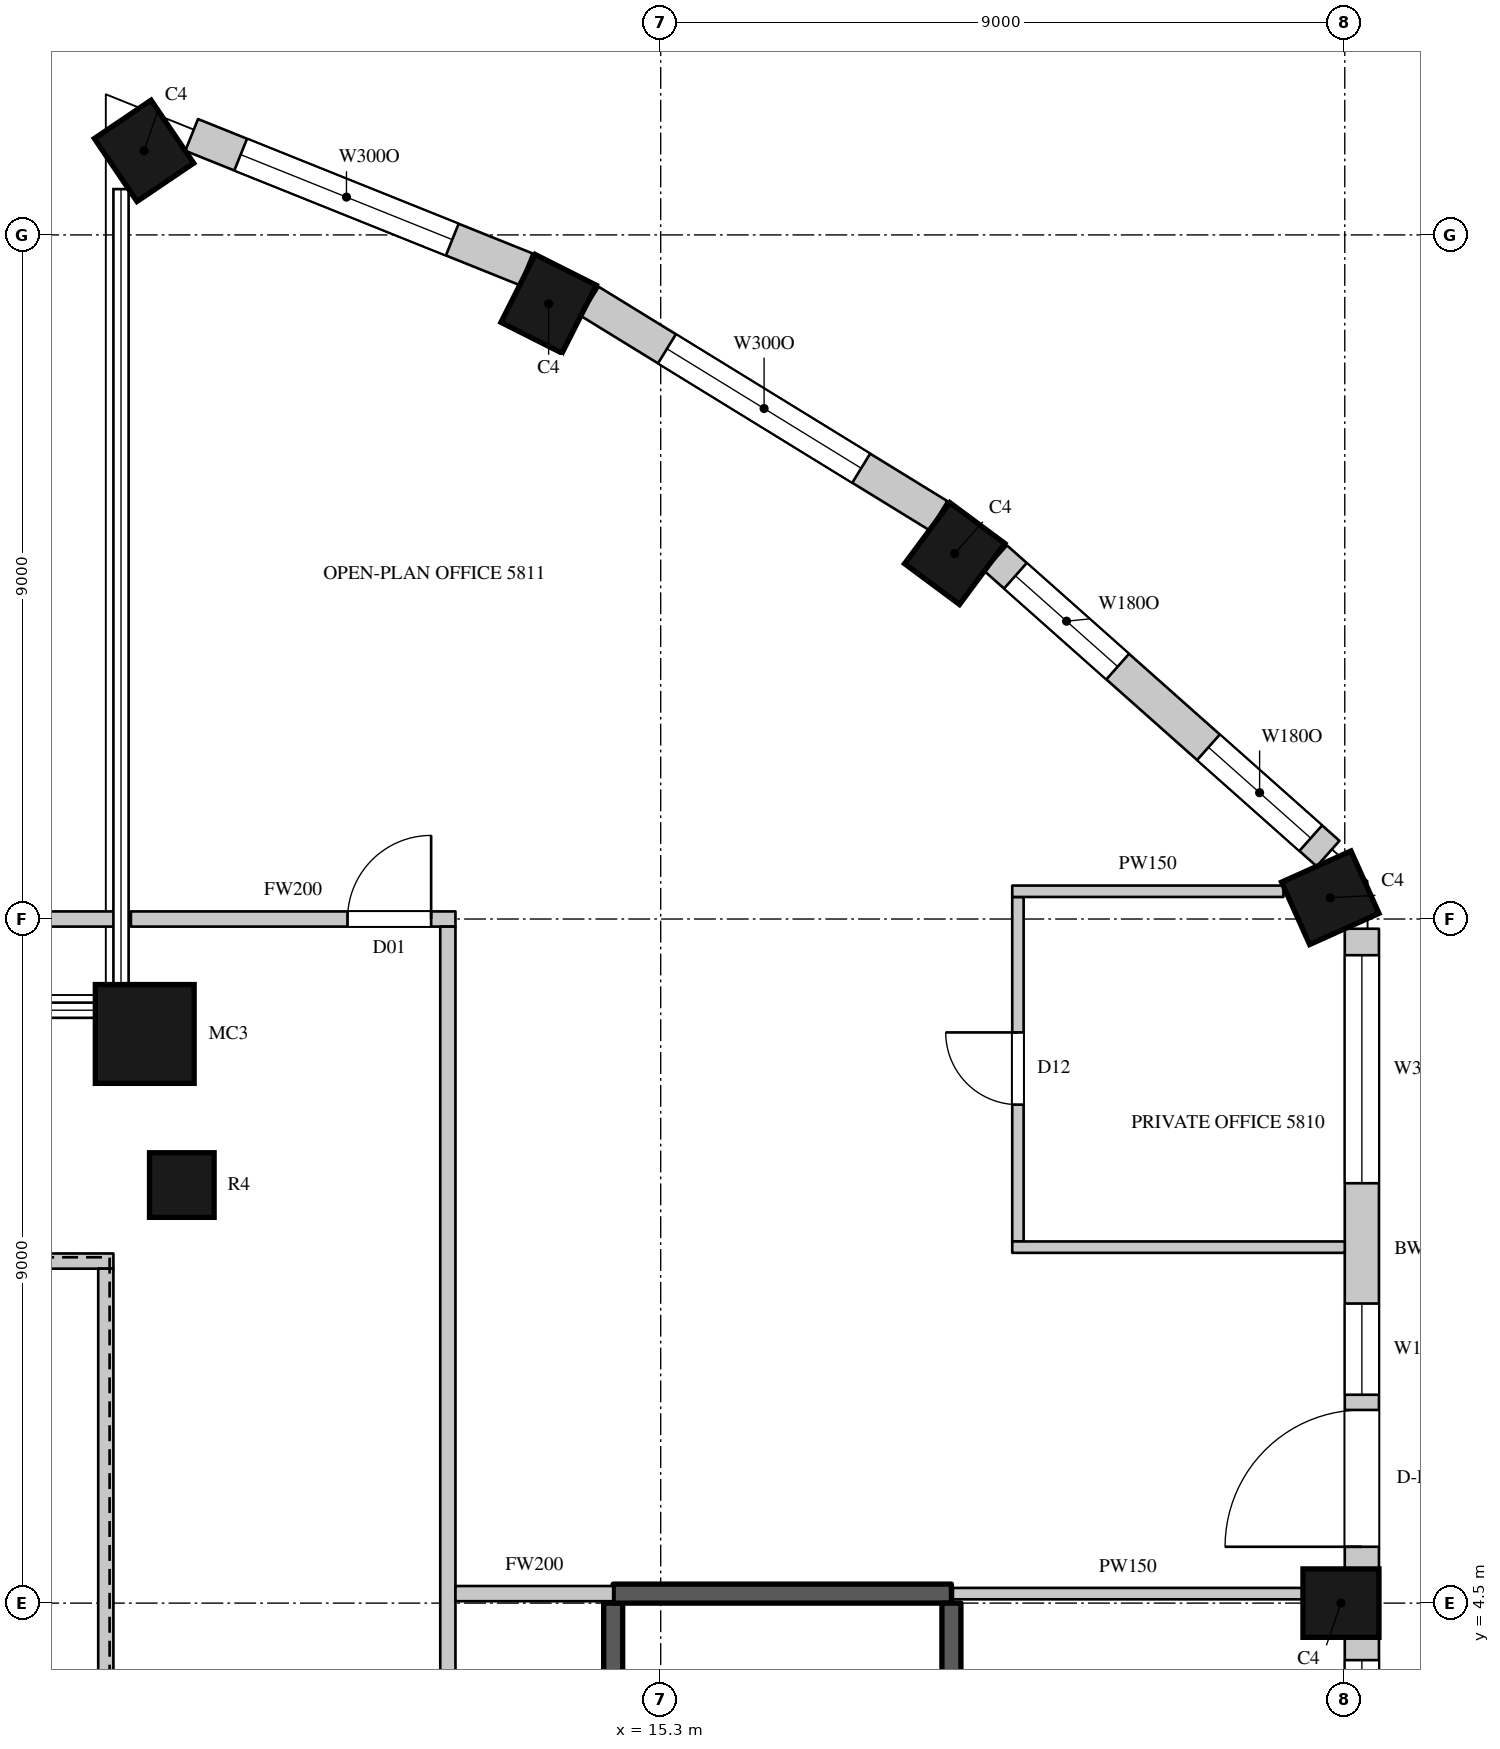
"""IFC4 building model, lengths in metres.
Left out: names, types, materials, properties, quantities, classifications, styles, units other than length and angle.
Written with IfcOpenShell. Run it as: python <this file> out.ifc"""

import sys

from ifc_helpers import new_model, si_unit, direction, frame, frame_2d, origin, origin_2d, place, context, subcontext, project, spatial, rectangle, circle, extrude, element, fill, save


model = new_model("IFC4")
c1 = context("Model", 3, precision=1e-05, world=origin(), true_north=direction((0.0, 1.0)))
c2 = subcontext(c1, "Body", "Model", "MODEL_VIEW")
j1 = project(units=[si_unit("LENGTHUNIT", "METRE"), si_unit("PLANEANGLEUNIT", "RADIAN")], contexts=[c1])
p1 = place(None, origin())
s1 = spatial("IfcSite", under=j1, at=p1, CompositionType="ELEMENT")
p2 = place(p1, origin())
s2 = spatial("IfcBuilding", under=s1, at=p2, CompositionType="ELEMENT")
p3 = place(p2, frame((0.0, 0.0, 259.8)))
s3 = spatial("IfcBuildingStorey", under=s2, at=p3, CompositionType="ELEMENT", Elevation=259.8)
p4 = place(p3, frame((8.503, 23.606, 0.0), z_axis=(0.0, 0.0, 1.0), x_axis=(-0.828469606019, -0.560034027451, 0.0)))
e1 = element("IfcColumn", 1, at=p4, inside=s3, PredefinedType="COLUMN", context=c2, shape_type="SweptSolid", body=[
    extrude(rectangle(XDim=0.9, YDim=1.0, at=origin_2d()), origin(), (0.0, 0.0, 1.0), 4.1),
])
p5 = place(p3, frame((8.512, 11.988, 0.0), z_axis=(0.0, 0.0, 1.0), x_axis=(1.0, 0.0, 0.0)))
e2 = element("IfcColumn", 2, at=p5, inside=s3, PredefinedType="COLUMN", context=c2, shape_type="SweptSolid", body=[
    extrude(circle(Radius=0.65, at=origin_2d()), origin(), (0.0, 0.0, 1.0), 4.1),
])
for number, where, z_axis, x_axis in (
    (3, (24.25, 4.5, 0.0), (0.0, 0.0, 1.0), (0.0, 1.0, 0.0)),
    (4, (24.11, 13.78, 0.0), (0.0, 0.0, 1.0), (-0.41, 0.912, 0.0)),
    (5, (19.168, 18.308, 0.0), (0.0, 0.0, 1.0), (-0.803, 0.596, 0.0)),
    (6, (13.826, 21.594, 0.0), (0.0, 0.0, 1.0), (-0.893, 0.45, 0.0)),
):
    element("IfcColumn", number, at=place(p3, frame(where, z_axis=z_axis, x_axis=x_axis)), inside=s3, PredefinedType="COLUMN", context=c2, shape_type="SweptSolid", body=[
        extrude(rectangle(XDim=0.9, YDim=1.0, at=origin_2d()), origin(), (0.0, 0.0, 1.0), 4.1),
    ])
p6 = place(p3, frame((9.0, 10.0, 0.0), z_axis=(0.0, 0.0, 1.0), x_axis=(1.0, 0.0, 0.0)))
e7 = element("IfcColumn", 7, at=p6, inside=s3, PredefinedType="COLUMN", context=c2, shape_type="SweptSolid", body=[
    extrude(circle(Radius=0.425, at=origin_2d()), origin(), (0.0, 0.0, 1.0), 4.1),
])
p7 = place(p3, frame((24.525, -4.05, 0.0), z_axis=(0.0, 0.0, 1.0), x_axis=(0.0, 1.0, 0.0)))
e8 = element("IfcWall", 8, at=p7, inside=s3, PredefinedType="SOLIDWALL", context=c2, shape_type="SweptSolid", body=[
    extrude(rectangle(XDim=8.1, YDim=0.45, at=frame_2d((4.05, 0.0))), origin(), (0.0, 0.0, 1.0), 3.8),
])
p8 = place(p7, frame((0.3, 0.0, 1.05)))
e9 = element("IfcOpeningElement", 9, at=p8, cuts=e8, PredefinedType="OPENING", context=c2, shape_type="SweptSolid", body=[
    extrude(rectangle(XDim=3.0, YDim=2.4, at=frame_2d((1.5, 1.2))), frame((0.0, 0.235, 0.0), z_axis=(0.0, -1.0, 0.0), x_axis=(1.0, 0.0, 0.0)), (0.0, 0.0, 1.0), 0.47),
])
p9 = place(p7, frame((4.8, 0.0, 1.05)))
e10 = element("IfcOpeningElement", 10, at=p9, cuts=e8, PredefinedType="OPENING", context=c2, shape_type="SweptSolid", body=[
    extrude(rectangle(XDim=3.0, YDim=2.4, at=frame_2d((1.5, 1.2))), frame((0.0, 0.235, 0.0), z_axis=(0.0, -1.0, 0.0), x_axis=(1.0, 0.0, 0.0)), (0.0, 0.0, 1.0), 0.47),
])
p10 = place(p3, frame((24.525, 4.95, 0.0), z_axis=(0.0, 0.0, 1.0), x_axis=(0.0, 1.0, 0.0)))
e11 = element("IfcWall", 11, at=p10, inside=s3, PredefinedType="SOLIDWALL", context=c2, shape_type="SweptSolid", body=[
    extrude(rectangle(XDim=8.422, YDim=0.45, at=frame_2d((4.211, 0.0))), origin(), (0.0, 0.0, 1.0), 3.8),
])
p11 = place(p10, frame((0.291, 0.0, 0.0)))
e12 = element("IfcOpeningElement", 12, at=p11, cuts=e11, PredefinedType="OPENING", context=c2, shape_type="SweptSolid", body=[
    extrude(rectangle(XDim=1.8, YDim=2.4, at=frame_2d((0.9, 1.2))), frame((0.0, 0.235, 0.0), z_axis=(0.0, -1.0, 0.0), x_axis=(1.0, 0.0, 0.0)), (0.0, 0.0, 1.0), 0.47),
])
p12 = place(p10, frame((2.291, 0.0, 1.05)))
e13 = element("IfcOpeningElement", 13, at=p12, cuts=e11, PredefinedType="OPENING", context=c2, shape_type="SweptSolid", body=[
    extrude(rectangle(XDim=1.2, YDim=2.4, at=frame_2d((0.6, 1.2))), frame((0.0, 0.235, 0.0), z_axis=(0.0, -1.0, 0.0), x_axis=(1.0, 0.0, 0.0)), (0.0, 0.0, 1.0), 0.47),
])
p13 = place(p10, frame((5.074, 0.0, 1.05)))
e14 = element("IfcOpeningElement", 14, at=p13, cuts=e11, PredefinedType="OPENING", context=c2, shape_type="SweptSolid", body=[
    extrude(rectangle(XDim=3.0, YDim=2.4, at=frame_2d((1.5, 1.2))), frame((0.0, 0.235, 0.0), z_axis=(0.0, -1.0, 0.0), x_axis=(1.0, 0.0, 0.0)), (0.0, 0.0, 1.0), 0.47),
])
p14 = place(p3, frame((24.081, 14.361, 0.0), z_axis=(0.0, 0.0, 1.0), x_axis=(-0.747570482973, 0.664182484704, 0.0)))
e15 = element("IfcWall", 15, at=p14, inside=s3, PredefinedType="SOLIDWALL", context=c2, shape_type="SweptSolid", body=[
    extrude(rectangle(XDim=5.85, YDim=0.45, at=frame_2d((2.925, 0.0))), origin(), (0.0, 0.0, 1.0), 3.8),
])
p15 = place(p14, frame((0.305, 0.0, 1.05)))
e16 = element("IfcOpeningElement", 16, at=p15, cuts=e15, PredefinedType="OPENING", context=c2, shape_type="SweptSolid", body=[
    extrude(rectangle(XDim=1.8, YDim=2.4, at=frame_2d((0.9, 1.2))), frame((0.0, 0.235, 0.0), z_axis=(0.0, -1.0, 0.0), x_axis=(1.0, 0.0, 0.0)), (0.0, 0.0, 1.0), 0.47),
])
p16 = place(p14, frame((3.703, 0.0, 1.05)))
e17 = element("IfcOpeningElement", 17, at=p16, cuts=e15, PredefinedType="OPENING", context=c2, shape_type="SweptSolid", body=[
    extrude(rectangle(XDim=1.8, YDim=2.4, at=frame_2d((0.9, 1.2))), frame((0.0, 0.235, 0.0), z_axis=(0.0, -1.0, 0.0), x_axis=(1.0, 0.0, 0.0)), (0.0, 0.0, 1.0), 0.47),
])
p17 = place(p3, frame((18.953, 18.806, 0.0), z_axis=(0.0, 0.0, 1.0), x_axis=(-0.851860664503, 0.523768468193, 0.0)))
e18 = element("IfcWall", 18, at=p17, inside=s3, PredefinedType="SOLIDWALL", context=c2, shape_type="SweptSolid", body=[
    extrude(rectangle(XDim=5.384, YDim=0.45, at=frame_2d((2.692, 0.0))), origin(), (0.0, 0.0, 1.0), 3.8),
])
p18 = place(p17, frame((1.192, 0.0, 1.05)))
e19 = element("IfcOpeningElement", 19, at=p18, cuts=e18, PredefinedType="OPENING", context=c2, shape_type="SweptSolid", body=[
    extrude(rectangle(XDim=3.0, YDim=2.4, at=frame_2d((1.5, 1.2))), frame((0.0, 0.235, 0.0), z_axis=(0.0, -1.0, 0.0), x_axis=(1.0, 0.0, 0.0)), (0.0, 0.0, 1.0), 0.47),
])
p19 = place(p3, frame((13.529, 22.048, 0.0), z_axis=(0.0, 0.0, 1.0), x_axis=(-0.927957332619, 0.372686448424, 0.0)))
e20 = element("IfcWall", 20, at=p19, inside=s3, PredefinedType="SOLIDWALL", context=c2, shape_type="SweptSolid", body=[
    extrude(rectangle(XDim=4.741, YDim=0.45, at=frame_2d((2.371, 0.0))), origin(), (0.0, 0.0, 1.0), 3.8),
])
p20 = place(p19, frame((1.047, 0.0, 1.05)))
e21 = element("IfcOpeningElement", 21, at=p20, cuts=e20, PredefinedType="OPENING", context=c2, shape_type="SweptSolid", body=[
    extrude(rectangle(XDim=3.0, YDim=2.4, at=frame_2d((1.5, 1.2))), frame((0.0, 0.235, 0.0), z_axis=(0.0, -1.0, 0.0), x_axis=(1.0, 0.0, 0.0)), (0.0, 0.0, 1.0), 0.47),
])
p21 = place(p3, frame((-6.27, 13.5, 0.0), z_axis=(0.0, 0.0, 1.0), x_axis=(1.0, 0.0, 0.0)))
e22 = element("IfcWall", 22, at=p21, inside=s3, PredefinedType="PARTITIONING", context=c2, shape_type="SweptSolid", body=[
    extrude(rectangle(XDim=14.57, YDim=0.2, at=frame_2d((7.285, 0.0))), origin(), (0.0, 0.0, 1.0), 3.8),
])
p22 = place(p3, frame((-6.1, 9.0, 0.0), z_axis=(0.0, 0.0, 1.0), x_axis=(1.0, 0.0, 0.0)))
e23 = element("IfcWall", 23, at=p22, inside=s3, PredefinedType="PARTITIONING", context=c2, shape_type="SweptSolid", body=[
    extrude(rectangle(XDim=14.2, YDim=0.2, at=frame_2d((7.1, 0.0))), origin(), (0.0, 0.0, 1.0), 3.8),
])
p23 = place(p3, frame((8.0, -8.9, 0.0), z_axis=(0.0, 0.0, 1.0), x_axis=(0.0, 1.0, 0.0)))
e24 = element("IfcWall", 24, at=p23, inside=s3, PredefinedType="PARTITIONING", context=c2, shape_type="SweptSolid", body=[
    extrude(rectangle(XDim=17.8, YDim=0.2, at=frame_2d((8.9, 0.0))), origin(), (0.0, 0.0, 1.0), 3.8),
])
p24 = place(p3, frame((8.33, 13.5, 0.0), z_axis=(0.0, 0.0, 1.0), x_axis=(1.0, 0.0, 0.0)))
e25 = element("IfcWall", 25, at=p24, inside=s3, PredefinedType="PARTITIONING", context=c2, shape_type="SweptSolid", body=[
    extrude(rectangle(XDim=4.27, YDim=0.2, at=frame_2d((2.135, 0.0))), origin(), (0.0, 0.0, 1.0), 3.8),
])
p25 = place(p24, frame((2.85, 0.0, 0.0)))
e26 = element("IfcOpeningElement", 26, at=p25, cuts=e25, PredefinedType="OPENING", context=c2, shape_type="SweptSolid", body=[
    extrude(rectangle(XDim=1.1, YDim=2.4, at=frame_2d((0.55, 1.2))), frame((0.0, 0.11, 0.0), z_axis=(0.0, -1.0, 0.0), x_axis=(1.0, 0.0, 0.0)), (0.0, 0.0, 1.0), 0.22),
])
p26 = place(p3, frame((12.5, -13.5, 0.0), z_axis=(0.0, 0.0, 1.0), x_axis=(0.0, 1.0, 0.0)))
e27 = element("IfcWall", 27, at=p26, inside=s3, PredefinedType="PARTITIONING", context=c2, shape_type="SweptSolid", body=[
    extrude(rectangle(XDim=26.9, YDim=0.2, at=frame_2d((13.45, 0.0))), origin(), (0.0, 0.0, 1.0), 3.8),
])
p27 = place(p26, frame((12.75, 0.0, 0.0)))
e28 = element("IfcOpeningElement", 28, at=p27, cuts=e27, PredefinedType="OPENING", context=c2, shape_type="SweptSolid", body=[
    extrude(rectangle(XDim=1.5, YDim=2.4, at=frame_2d((0.75, 1.2))), frame((0.0, 0.11, 0.0), z_axis=(0.0, -1.0, 0.0), x_axis=(1.0, 0.0, 0.0)), (0.0, 0.0, 1.0), 0.22),
])
p28 = place(p3, frame((12.6, 4.625, 0.0), z_axis=(0.0, 0.0, 1.0), x_axis=(1.0, 0.0, 0.0)))
e29 = element("IfcWall", 29, at=p28, inside=s3, PredefinedType="PARTITIONING", context=c2, shape_type="SweptSolid", body=[
    extrude(rectangle(XDim=2.075, YDim=0.2, at=frame_2d((1.038, 0.0))), origin(), (0.0, 0.0, 1.0), 3.8),
])
p29 = place(p3, frame((19.145, 4.625, 0.0), z_axis=(0.0, 0.0, 1.0), x_axis=(1.0, 0.0, 0.0)))
e30 = element("IfcWall", 30, at=p29, inside=s3, PredefinedType="PARTITIONING", context=c2, shape_type="SweptSolid", body=[
    extrude(rectangle(XDim=4.605, YDim=0.15, at=frame_2d((2.302, 0.0))), origin(), (0.0, 0.0, 1.0), 3.8),
])
p30 = place(p3, frame((20.0, 9.258, 0.0), z_axis=(0.0, 0.0, 1.0), x_axis=(0.0, 1.0, 0.0)))
e31 = element("IfcWall", 31, at=p30, inside=s3, PredefinedType="PARTITIONING", context=c2, shape_type="SweptSolid", body=[
    extrude(rectangle(XDim=4.532, YDim=0.15, at=frame_2d((2.266, 0.0))), origin(), (0.0, 0.0, 1.0), 3.8),
])
p31 = place(p30, frame((1.8, 0.0, 0.0)))
e32 = element("IfcOpeningElement", 32, at=p31, cuts=e31, PredefinedType="OPENING", context=c2, shape_type="SweptSolid", body=[
    extrude(rectangle(XDim=0.95, YDim=2.2, at=frame_2d((0.475, 1.1))), frame((0.0, 0.085, 0.0), z_axis=(0.0, -1.0, 0.0), x_axis=(1.0, 0.0, 0.0)), (0.0, 0.0, 1.0), 0.17),
])
p32 = place(p3, frame((19.925, 9.183, 0.0), z_axis=(0.0, 0.0, 1.0), x_axis=(1.0, 0.0, 0.0)))
e33 = element("IfcWall", 33, at=p32, inside=s3, PredefinedType="PARTITIONING", context=c2, shape_type="SweptSolid", body=[
    extrude(rectangle(XDim=4.375, YDim=0.15, at=frame_2d((2.188, 0.0))), origin(), (0.0, 0.0, 1.0), 3.15),
])
p33 = place(p3, frame((19.925, 13.865, 0.0), z_axis=(0.0, 0.0, 1.0), x_axis=(1.0, 0.0, 0.0)))
e34 = element("IfcWall", 34, at=p33, inside=s3, PredefinedType="PARTITIONING", context=c2, shape_type="SweptSolid", body=[
    extrude(rectangle(XDim=3.568, YDim=0.15, at=frame_2d((1.784, 0.0))), origin(), (0.0, 0.0, 1.0), 3.8),
])
p34 = place(p3, frame((14.675, -4.5, 0.0), z_axis=(0.0, 0.0, 1.0), x_axis=(0.0, 1.0, 0.0)))
e35 = element("IfcWall", 35, at=p34, inside=s3, PredefinedType="SHEAR", context=c2, shape_type="SweptSolid", body=[
    extrude(rectangle(XDim=9.0, YDim=0.25, at=frame_2d((4.5, 0.0))), origin(), (0.0, 0.0, 1.0), 3.8),
])
p35 = place(p34, frame((0.45, 0.0, 0.0)))
e36 = element("IfcOpeningElement", 36, at=p35, cuts=e35, PredefinedType="OPENING", context=c2, shape_type="SweptSolid", body=[
    extrude(rectangle(XDim=1.1, YDim=2.2, at=frame_2d((0.55, 1.1))), frame((0.0, 0.135, 0.0), z_axis=(0.0, -1.0, 0.0), x_axis=(1.0, 0.0, 0.0)), (0.0, 0.0, 1.0), 0.27),
])
p36 = place(p3, frame((14.675, 4.625, 0.0), z_axis=(0.0, 0.0, 1.0), x_axis=(1.0, 0.0, 0.0)))
e37 = element("IfcWall", 37, at=p36, inside=s3, PredefinedType="SHEAR", context=c2, shape_type="SweptSolid", body=[
    extrude(rectangle(XDim=4.45, YDim=0.25, at=frame_2d((2.225, 0.0))), origin(), (0.0, 0.0, 1.0), 3.8),
])
p37 = place(p3, frame((19.125, -4.5, 0.0), z_axis=(0.0, 0.0, 1.0), x_axis=(0.0, 1.0, 0.0)))
e38 = element("IfcWall", 38, at=p37, inside=s3, PredefinedType="SHEAR", context=c2, shape_type="SweptSolid", body=[
    extrude(rectangle(XDim=9.0, YDim=0.25, at=frame_2d((4.5, 0.0))), origin(), (0.0, 0.0, 1.0), 3.8),
])
p38 = place(p9, origin())
e39 = element("IfcWindow", 39, at=p38, inside=s3, PartitioningType="SINGLE_PANEL", PredefinedType="WINDOW", context=c2, shape_type="SweptSolid", body=[
    extrude(rectangle(XDim=3.0, YDim=2.4, at=frame_2d((1.5, 1.2))), frame((0.0, 0.135, 0.0), z_axis=(0.0, -1.0, 0.0), x_axis=(1.0, 0.0, 0.0)), (0.0, 0.0, 1.0), 0.06),
])
fill(e10, e39)
p39 = place(p11, origin())
e40 = element("IfcDoor", 40, at=p39, inside=s3, OperationType="SLIDING_TO_LEFT", PredefinedType="DOOR", context=c2, shape_type="SweptSolid", body=[
    extrude(rectangle(XDim=1.8, YDim=2.4, at=frame_2d((0.9, 1.2))), frame((0.0, 0.13, 0.0), z_axis=(0.0, -1.0, 0.0), x_axis=(1.0, 0.0, 0.0)), (0.0, 0.0, 1.0), 0.05),
])
fill(e12, e40)
p40 = place(p12, origin())
e41 = element("IfcWindow", 41, at=p40, inside=s3, PartitioningType="SINGLE_PANEL", PredefinedType="WINDOW", context=c2, shape_type="SweptSolid", body=[
    extrude(rectangle(XDim=1.2, YDim=2.4, at=frame_2d((0.6, 1.2))), frame((0.0, 0.135, 0.0), z_axis=(0.0, -1.0, 0.0), x_axis=(1.0, 0.0, 0.0)), (0.0, 0.0, 1.0), 0.06),
])
fill(e13, e41)
p41 = place(p13, origin())
e42 = element("IfcWindow", 42, at=p41, inside=s3, PartitioningType="SINGLE_PANEL", PredefinedType="WINDOW", context=c2, shape_type="SweptSolid", body=[
    extrude(rectangle(XDim=3.0, YDim=2.4, at=frame_2d((1.5, 1.2))), frame((0.0, 0.135, 0.0), z_axis=(0.0, -1.0, 0.0), x_axis=(1.0, 0.0, 0.0)), (0.0, 0.0, 1.0), 0.06),
])
fill(e14, e42)
p42 = place(p15, origin())
e43 = element("IfcWindow", 43, at=p42, inside=s3, PartitioningType="SINGLE_PANEL", PredefinedType="WINDOW", context=c2, shape_type="SweptSolid", body=[
    extrude(rectangle(XDim=1.8, YDim=2.4, at=frame_2d((0.9, 1.2))), frame((0.0, 0.135, 0.0), z_axis=(0.0, -1.0, 0.0), x_axis=(1.0, 0.0, 0.0)), (0.0, 0.0, 1.0), 0.06),
])
fill(e16, e43)
p43 = place(p16, origin())
e44 = element("IfcWindow", 44, at=p43, inside=s3, PartitioningType="SINGLE_PANEL", PredefinedType="WINDOW", context=c2, shape_type="SweptSolid", body=[
    extrude(rectangle(XDim=1.8, YDim=2.4, at=frame_2d((0.9, 1.2))), frame((0.0, 0.135, 0.0), z_axis=(0.0, -1.0, 0.0), x_axis=(1.0, 0.0, 0.0)), (0.0, 0.0, 1.0), 0.06),
])
fill(e17, e44)
p44 = place(p18, origin())
e45 = element("IfcWindow", 45, at=p44, inside=s3, PartitioningType="SINGLE_PANEL", PredefinedType="WINDOW", context=c2, shape_type="SweptSolid", body=[
    extrude(rectangle(XDim=3.0, YDim=2.4, at=frame_2d((1.5, 1.2))), frame((0.0, 0.135, 0.0), z_axis=(0.0, -1.0, 0.0), x_axis=(1.0, 0.0, 0.0)), (0.0, 0.0, 1.0), 0.06),
])
fill(e19, e45)
p45 = place(p20, origin())
e46 = element("IfcWindow", 46, at=p45, inside=s3, PartitioningType="SINGLE_PANEL", PredefinedType="WINDOW", context=c2, shape_type="SweptSolid", body=[
    extrude(rectangle(XDim=3.0, YDim=2.4, at=frame_2d((1.5, 1.2))), frame((0.0, 0.135, 0.0), z_axis=(0.0, -1.0, 0.0), x_axis=(1.0, 0.0, 0.0)), (0.0, 0.0, 1.0), 0.06),
])
fill(e21, e46)
p46 = place(p25, origin())
e47 = element("IfcDoor", 47, at=p46, inside=s3, OperationType="SINGLE_SWING_RIGHT", PredefinedType="DOOR", context=c2, shape_type="SweptSolid", body=[
    extrude(rectangle(XDim=1.1, YDim=2.4, at=frame_2d((0.55, 1.2))), frame((0.0, 0.025, 0.0), z_axis=(0.0, -1.0, 0.0), x_axis=(1.0, 0.0, 0.0)), (0.0, 0.0, 1.0), 0.05),
])
fill(e26, e47)
p47 = place(p31, origin())
e48 = element("IfcDoor", 48, at=p47, inside=s3, OperationType="SINGLE_SWING_RIGHT", PredefinedType="DOOR", context=c2, shape_type="SweptSolid", body=[
    extrude(rectangle(XDim=0.95, YDim=2.2, at=frame_2d((0.475, 1.1))), frame((0.0, 0.025, 0.0), z_axis=(0.0, -1.0, 0.0), x_axis=(1.0, 0.0, 0.0)), (0.0, 0.0, 1.0), 0.05),
])
fill(e32, e48)
save(model, sys.argv[1])
